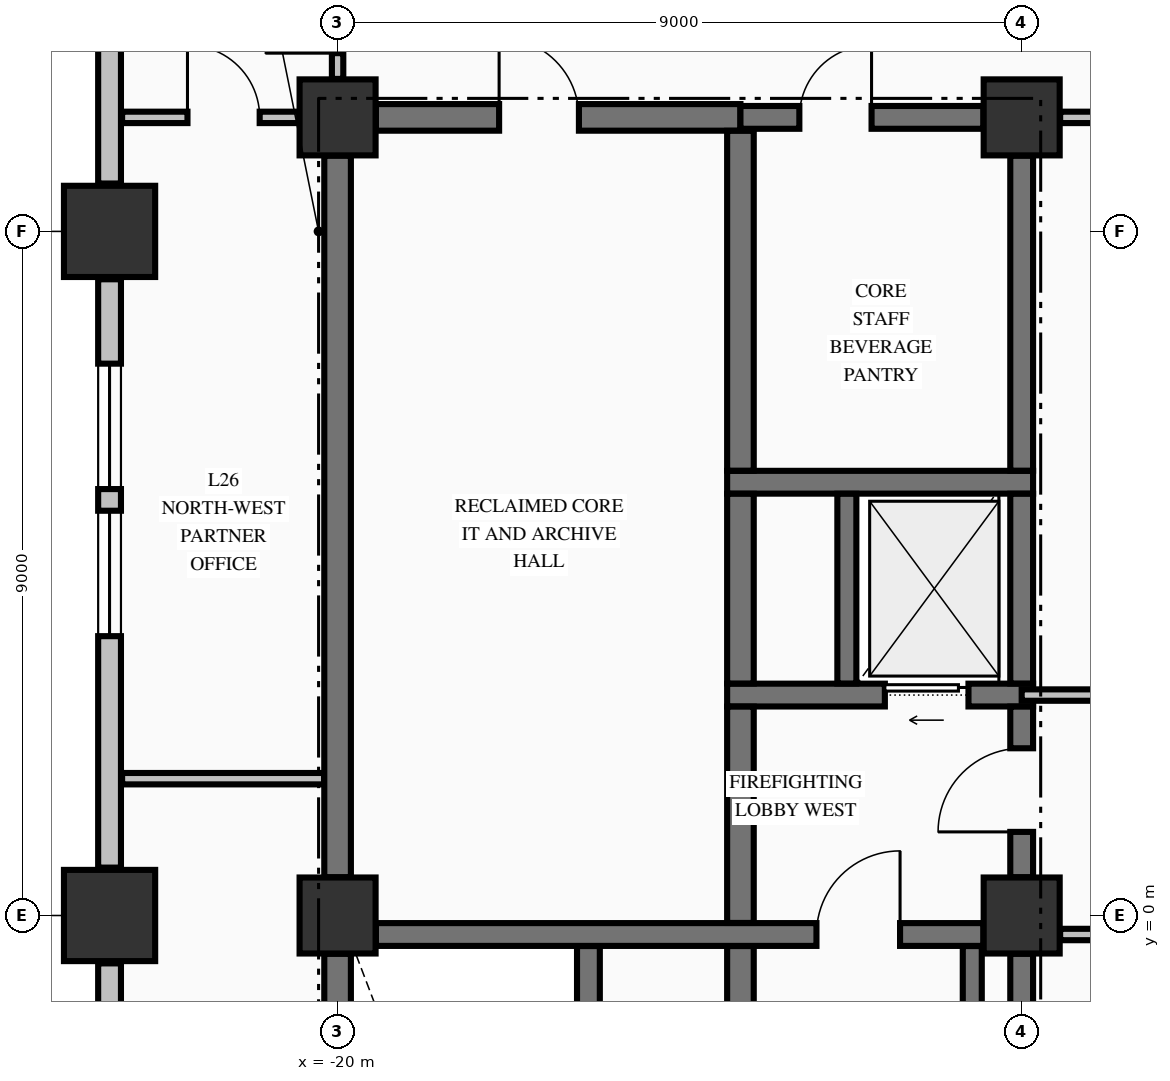
"""IFC4 building model, lengths in metres.
Left out: names, types, materials, properties, quantities, classifications, styles, units other than length and angle.
Written with IfcOpenShell. Run it as: python <this file> out.ifc"""

import sys

from ifc_helpers import new_model, si_unit, direction, frame, frame_2d, origin, origin_2d, place, context, subcontext, project, spatial, rectangle, extrude, element, fill, save


model = new_model("IFC4")
c1 = context("Model", 3, precision=1e-05, world=origin(), true_north=direction((0.0, 1.0)))
c2 = subcontext(c1, "Body", "Model", "MODEL_VIEW")
j1 = project(units=[si_unit("LENGTHUNIT", "METRE"), si_unit("PLANEANGLEUNIT", "RADIAN")], contexts=[c1])
p1 = place(None, origin())
s1 = spatial("IfcSite", under=j1, at=p1, CompositionType="ELEMENT")
p2 = place(p1, origin())
s2 = spatial("IfcBuilding", under=s1, at=p2, CompositionType="ELEMENT")
p3 = place(p2, frame((0.0, 0.0, 105.64)))
s3 = spatial("IfcBuildingStorey", under=s2, at=p3, CompositionType="ELEMENT", Elevation=105.64)
for number, where, z_axis, x_axis in (
    (1, (-23.0, 0.0, -0.25), (0.0, 0.0, 1.0), (1.0, 0.0, 0.0)),
    (2, (-23.0, 9.0, -0.25), (0.0, 0.0, 1.0), (1.0, 0.0, 0.0)),
):
    element("IfcColumn", number, at=place(p3, frame(where, z_axis=z_axis, x_axis=x_axis)), inside=s3, PredefinedType="COLUMN", context=c2, shape_type="SweptSolid", body=[
        extrude(rectangle(XDim=1.2, YDim=1.2, at=origin_2d()), origin(), (0.0, 0.0, 1.0), 3.57),
    ])
for number, where, z_axis, x_axis in (
    (3, (-20.0, 10.5, -0.25), (0.0, 0.0, 1.0), (1.0, 0.0, 0.0)),
    (4, (-11.0, 0.0, -0.25), (0.0, 0.0, 1.0), (1.0, 0.0, 0.0)),
    (5, (-11.0, 10.5, -0.25), (0.0, 0.0, 1.0), (1.0, 0.0, 0.0)),
    (6, (-20.0, 0.0, -0.25), (0.0, 0.0, 1.0), (1.0, 0.0, 0.0)),
):
    element("IfcColumn", number, at=place(p3, frame(where, z_axis=z_axis, x_axis=x_axis)), inside=s3, PredefinedType="COLUMN", context=c2, shape_type="SweptSolid", body=[
        extrude(rectangle(XDim=1.0, YDim=1.0, at=origin_2d()), origin(), (0.0, 0.0, 1.0), 3.57),
    ])
p4 = place(p3, frame((-23.0, -0.63, 0.0), z_axis=(0.0, 0.0, 1.0), x_axis=(0.0, -1.0, 0.0)))
e7 = element("IfcWall", 7, at=p4, inside=s3, PredefinedType="STANDARD", context=c2, shape_type="SweptSolid", body=[
    extrude(rectangle(XDim=7.74, YDim=0.3, at=frame_2d((3.87, 0.0))), origin(), (0.0, 0.0, 1.0), 2.712),
])
p5 = place(p4, frame((1.11, 0.0, 0.8)))
e8 = element("IfcOpeningElement", 8, at=p5, cuts=e7, PredefinedType="OPENING", context=c2, shape_type="SweptSolid", body=[
    extrude(rectangle(XDim=1.65, YDim=1.7, at=frame_2d((0.825, 0.85))), frame((0.0, 0.16, 0.0), z_axis=(0.0, -1.0, 0.0), x_axis=(1.0, 0.0, 0.0)), (0.0, 0.0, 1.0), 0.32),
])
p6 = place(p4, frame((3.045, 0.0, 0.8)))
e9 = element("IfcOpeningElement", 9, at=p6, cuts=e7, PredefinedType="OPENING", context=c2, shape_type="SweptSolid", body=[
    extrude(rectangle(XDim=1.65, YDim=1.7, at=frame_2d((0.825, 0.85))), frame((0.0, 0.16, 0.0), z_axis=(0.0, -1.0, 0.0), x_axis=(1.0, 0.0, 0.0)), (0.0, 0.0, 1.0), 0.32),
])
p7 = place(p4, frame((4.98, 0.0, 0.8)))
e10 = element("IfcOpeningElement", 10, at=p7, cuts=e7, PredefinedType="OPENING", context=c2, shape_type="SweptSolid", body=[
    extrude(rectangle(XDim=1.65, YDim=1.7, at=frame_2d((0.825, 0.85))), frame((0.0, 0.16, 0.0), z_axis=(0.0, -1.0, 0.0), x_axis=(1.0, 0.0, 0.0)), (0.0, 0.0, 1.0), 0.32),
])
p8 = place(p3, frame((-23.0, 8.37, 0.0), z_axis=(0.0, 0.0, 1.0), x_axis=(0.0, -1.0, 0.0)))
e11 = element("IfcWall", 11, at=p8, inside=s3, PredefinedType="STANDARD", context=c2, shape_type="SweptSolid", body=[
    extrude(rectangle(XDim=7.74, YDim=0.3, at=frame_2d((3.87, 0.0))), origin(), (0.0, 0.0, 1.0), 2.712),
])
p9 = place(p8, frame((1.11, 0.0, 0.8)))
e12 = element("IfcOpeningElement", 12, at=p9, cuts=e11, PredefinedType="OPENING", context=c2, shape_type="SweptSolid", body=[
    extrude(rectangle(XDim=1.65, YDim=1.7, at=frame_2d((0.825, 0.85))), frame((0.0, 0.16, 0.0), z_axis=(0.0, -1.0, 0.0), x_axis=(1.0, 0.0, 0.0)), (0.0, 0.0, 1.0), 0.32),
])
p10 = place(p8, frame((3.045, 0.0, 0.8)))
e13 = element("IfcOpeningElement", 13, at=p10, cuts=e11, PredefinedType="OPENING", context=c2, shape_type="SweptSolid", body=[
    extrude(rectangle(XDim=1.65, YDim=1.7, at=frame_2d((0.825, 0.85))), frame((0.0, 0.16, 0.0), z_axis=(0.0, -1.0, 0.0), x_axis=(1.0, 0.0, 0.0)), (0.0, 0.0, 1.0), 0.32),
])
p11 = place(p3, frame((-23.0, 20.37, 0.0), z_axis=(0.0, 0.0, 1.0), x_axis=(0.0, -1.0, 0.0)))
e14 = element("IfcWall", 14, at=p11, inside=s3, PredefinedType="STANDARD", context=c2, shape_type="SweptSolid", body=[
    extrude(rectangle(XDim=10.74, YDim=0.3, at=frame_2d((5.37, 0.0))), origin(), (0.0, 0.0, 1.0), 2.712),
])
p12 = place(p3, frame((-19.496, -0.25, 0.0), z_axis=(0.0, 0.0, 1.0), x_axis=(1.0, 0.0, 0.0)))
e15 = element("IfcWall", 15, at=p12, inside=s3, PredefinedType="SHEAR", context=c2, shape_type="SweptSolid", body=[
    extrude(rectangle(XDim=7.992, YDim=0.3, at=frame_2d((3.996, 0.0))), origin(), (0.0, 0.0, 1.0), 3.32),
])
p13 = place(p12, frame((5.796, 0.0, 0.0)))
e16 = element("IfcOpeningElement", 16, at=p13, cuts=e15, PredefinedType="OPENING", context=c2, shape_type="SweptSolid", body=[
    extrude(rectangle(XDim=1.1, YDim=2.15, at=frame_2d((0.55, 1.075))), frame((0.0, 0.16, 0.0), z_axis=(0.0, -1.0, 0.0), x_axis=(1.0, 0.0, 0.0)), (0.0, 0.0, 1.0), 0.32),
])
p14 = place(p3, frame((-14.875, 2.9, 0.0), z_axis=(0.0, 0.0, 1.0), x_axis=(1.0, 0.0, 0.0)))
e17 = element("IfcWall", 17, at=p14, inside=s3, PredefinedType="SHEAR", context=c2, shape_type="SweptSolid", body=[
    extrude(rectangle(XDim=4.025, YDim=0.3, at=frame_2d((2.012, 0.0))), origin(), (0.0, 0.0, 1.0), 3.32),
])
p15 = place(p14, frame((2.075, 0.0, 0.0)))
e18 = element("IfcOpeningElement", 18, at=p15, cuts=e17, PredefinedType="OPENING", context=c2, shape_type="SweptSolid", body=[
    extrude(rectangle(XDim=1.1, YDim=2.2, at=frame_2d((0.55, 1.1))), frame((0.0, 0.16, 0.0), z_axis=(0.0, -1.0, 0.0), x_axis=(1.0, 0.0, 0.0)), (0.0, 0.0, 1.0), 0.32),
])
p16 = place(p3, frame((-14.875, 5.7, 0.0), z_axis=(0.0, 0.0, 1.0), x_axis=(1.0, 0.0, 0.0)))
e19 = element("IfcWall", 19, at=p16, inside=s3, PredefinedType="SHEAR", context=c2, shape_type="SweptSolid", body=[
    extrude(rectangle(XDim=4.025, YDim=0.3, at=frame_2d((2.012, 0.0))), origin(), (0.0, 0.0, 1.0), 3.32),
])
p17 = place(p3, frame((-19.496, 10.5, 0.0), z_axis=(0.0, 0.0, 1.0), x_axis=(1.0, 0.0, 0.0)))
e20 = element("IfcWall", 20, at=p17, inside=s3, PredefinedType="SHEAR", context=c2, shape_type="SweptSolid", body=[
    extrude(rectangle(XDim=4.796, YDim=0.35, at=frame_2d((2.398, 0.0))), origin(), (0.0, 0.0, 1.0), 3.32),
])
p18 = place(p17, frame((1.621, 0.0, 0.0)))
e21 = element("IfcOpeningElement", 21, at=p18, cuts=e20, PredefinedType="OPENING", context=c2, shape_type="SweptSolid", body=[
    extrude(rectangle(XDim=1.05, YDim=2.15, at=frame_2d((0.525, 1.075))), frame((0.0, 0.185, 0.0), z_axis=(0.0, -1.0, 0.0), x_axis=(1.0, 0.0, 0.0)), (0.0, 0.0, 1.0), 0.37),
])
p19 = place(p3, frame((-14.7, 10.5, 0.0), z_axis=(0.0, 0.0, 1.0), x_axis=(1.0, 0.0, 0.0)))
e22 = element("IfcWall", 22, at=p19, inside=s3, PredefinedType="SHEAR", context=c2, shape_type="SweptSolid", body=[
    extrude(rectangle(XDim=3.196, YDim=0.3, at=frame_2d((1.598, 0.0))), origin(), (0.0, 0.0, 1.0), 3.32),
])
p20 = place(p19, frame((0.775, 0.0, 0.0)))
e23 = element("IfcOpeningElement", 23, at=p20, cuts=e22, PredefinedType="OPENING", context=c2, shape_type="SweptSolid", body=[
    extrude(rectangle(XDim=0.95, YDim=2.15, at=frame_2d((0.475, 1.075))), frame((0.0, 0.16, 0.0), z_axis=(0.0, -1.0, 0.0), x_axis=(1.0, 0.0, 0.0)), (0.0, 0.0, 1.0), 0.32),
])
p21 = place(p3, frame((-10.494, -0.25, 0.0), z_axis=(0.0, 0.0, 1.0), x_axis=(1.0, 0.0, 0.0)))
e24 = element("IfcWall", 24, at=p21, inside=s3, PredefinedType="PARTITIONING", context=c2, shape_type="SweptSolid", body=[
    extrude(rectangle(XDim=20.988, YDim=0.15, at=frame_2d((10.494, 0.0))), origin(), (0.0, 0.0, 1.0), 3.32),
])
p22 = place(p21, frame((13.994, 0.0, 0.0)))
e25 = element("IfcOpeningElement", 25, at=p22, cuts=e24, PredefinedType="OPENING", context=c2, shape_type="SweptSolid", body=[
    extrude(rectangle(XDim=1.1, YDim=2.15, at=frame_2d((0.55, 1.075))), frame((0.0, 0.085, 0.0), z_axis=(0.0, -1.0, 0.0), x_axis=(1.0, 0.0, 0.0)), (0.0, 0.0, 1.0), 0.17),
])
p23 = place(p21, frame((5.939, 0.0, 0.0)))
e26 = element("IfcOpeningElement", 26, at=p23, cuts=e24, PredefinedType="OPENING", context=c2, shape_type="SweptSolid", body=[
    extrude(rectangle(XDim=1.05, YDim=2.15, at=frame_2d((0.525, 1.075))), frame((0.0, 0.085, 0.0), z_axis=(0.0, -1.0, 0.0), x_axis=(1.0, 0.0, 0.0)), (0.0, 0.0, 1.0), 0.17),
])
p24 = place(p21, frame((18.089, 0.0, 0.0)))
e27 = element("IfcOpeningElement", 27, at=p24, cuts=e24, PredefinedType="OPENING", context=c2, shape_type="SweptSolid", body=[
    extrude(rectangle(XDim=0.95, YDim=2.15, at=frame_2d((0.475, 1.075))), frame((0.0, 0.085, 0.0), z_axis=(0.0, -1.0, 0.0), x_axis=(1.0, 0.0, 0.0)), (0.0, 0.0, 1.0), 0.17),
])
p25 = place(p3, frame((-22.835, 1.8, 0.0), z_axis=(0.0, 0.0, 1.0), x_axis=(1.0, 0.0, 0.0)))
e28 = element("IfcWall", 28, at=p25, inside=s3, PredefinedType="PARTITIONING", context=c2, shape_type="SweptSolid", body=[
    extrude(rectangle(XDim=2.657, YDim=0.15, at=frame_2d((1.329, 0.0))), origin(), (0.0, 0.0, 1.0), 3.32),
])
p26 = place(p3, frame((-11.0, 2.9, 0.0), z_axis=(0.0, 0.0, 1.0), x_axis=(1.0, 0.0, 0.0)))
e29 = element("IfcWall", 29, at=p26, inside=s3, PredefinedType="PARTITIONING", context=c2, shape_type="SweptSolid", body=[
    extrude(rectangle(XDim=22.0, YDim=0.15, at=frame_2d((11.0, 0.0))), origin(), (0.0, 0.0, 1.0), 3.32),
])
p27 = place(p26, frame((14.5, 0.0, 0.0)))
e30 = element("IfcOpeningElement", 30, at=p27, cuts=e29, PredefinedType="OPENING", context=c2, shape_type="SweptSolid", body=[
    extrude(rectangle(XDim=1.1, YDim=2.15, at=frame_2d((0.55, 1.075))), frame((0.0, 0.085, 0.0), z_axis=(0.0, -1.0, 0.0), x_axis=(1.0, 0.0, 0.0)), (0.0, 0.0, 1.0), 0.17),
])
p28 = place(p26, frame((6.445, 0.0, 0.0)))
e31 = element("IfcOpeningElement", 31, at=p28, cuts=e29, PredefinedType="OPENING", context=c2, shape_type="SweptSolid", body=[
    extrude(rectangle(XDim=1.05, YDim=2.15, at=frame_2d((0.525, 1.075))), frame((0.0, 0.085, 0.0), z_axis=(0.0, -1.0, 0.0), x_axis=(1.0, 0.0, 0.0)), (0.0, 0.0, 1.0), 0.17),
])
p29 = place(p26, frame((18.52, 0.0, 0.0)))
e32 = element("IfcOpeningElement", 32, at=p29, cuts=e29, PredefinedType="OPENING", context=c2, shape_type="SweptSolid", body=[
    extrude(rectangle(XDim=1.1, YDim=2.15, at=frame_2d((0.55, 1.075))), frame((0.0, 0.085, 0.0), z_axis=(0.0, -1.0, 0.0), x_axis=(1.0, 0.0, 0.0)), (0.0, 0.0, 1.0), 0.17),
])
p30 = place(p3, frame((-22.835, 10.5, 0.0), z_axis=(0.0, 0.0, 1.0), x_axis=(1.0, 0.0, 0.0)))
e33 = element("IfcWall", 33, at=p30, inside=s3, PredefinedType="PARTITIONING", context=c2, shape_type="SweptSolid", body=[
    extrude(rectangle(XDim=2.329, YDim=0.15, at=frame_2d((1.165, 0.0))), origin(), (0.0, 0.0, 1.0), 3.32),
])
p31 = place(p30, frame((0.86, 0.0, 0.0)))
e34 = element("IfcOpeningElement", 34, at=p31, cuts=e33, PredefinedType="OPENING", context=c2, shape_type="SweptSolid", body=[
    extrude(rectangle(XDim=0.95, YDim=2.15, at=frame_2d((0.475, 1.075))), frame((0.0, 0.085, 0.0), z_axis=(0.0, -1.0, 0.0), x_axis=(1.0, 0.0, 0.0)), (0.0, 0.0, 1.0), 0.17),
])
p32 = place(p3, frame((-10.494, 10.5, 0.0), z_axis=(0.0, 0.0, 1.0), x_axis=(1.0, 0.0, 0.0)))
e35 = element("IfcWall", 35, at=p32, inside=s3, PredefinedType="PARTITIONING", context=c2, shape_type="SweptSolid", body=[
    extrude(rectangle(XDim=20.988, YDim=0.15, at=frame_2d((10.494, 0.0))), origin(), (0.0, 0.0, 1.0), 3.32),
])
p33 = place(p32, frame((13.994, 0.0, 0.0)))
e36 = element("IfcOpeningElement", 36, at=p33, cuts=e35, PredefinedType="OPENING", context=c2, shape_type="SweptSolid", body=[
    extrude(rectangle(XDim=1.1, YDim=2.15, at=frame_2d((0.55, 1.075))), frame((0.0, 0.085, 0.0), z_axis=(0.0, -1.0, 0.0), x_axis=(1.0, 0.0, 0.0)), (0.0, 0.0, 1.0), 0.17),
])
p34 = place(p3, frame((-20.0, -9.446, 0.0), z_axis=(0.0, 0.0, 1.0), x_axis=(0.0, 1.0, 0.0)))
e37 = element("IfcWall", 37, at=p34, inside=s3, PredefinedType="SHEAR", context=c2, shape_type="SweptSolid", body=[
    extrude(rectangle(XDim=8.942, YDim=0.35, at=frame_2d((4.471, 0.0))), origin(), (0.0, 0.0, 1.0), 3.32),
])
p35 = place(p3, frame((-20.0, 0.504, 0.0), z_axis=(0.0, 0.0, 1.0), x_axis=(0.0, 1.0, 0.0)))
e38 = element("IfcWall", 38, at=p35, inside=s3, PredefinedType="SHEAR", context=c2, shape_type="SweptSolid", body=[
    extrude(rectangle(XDim=9.492, YDim=0.35, at=frame_2d((4.746, 0.0))), origin(), (0.0, 0.0, 1.0), 3.32),
])
p36 = place(p3, frame((-16.7, -9.773, 0.0), z_axis=(0.0, 0.0, 1.0), x_axis=(0.0, 1.0, 0.0)))
e39 = element("IfcWall", 39, at=p36, inside=s3, PredefinedType="SHEAR", context=c2, shape_type="SweptSolid", body=[
    extrude(rectangle(XDim=9.371, YDim=0.3, at=frame_2d((4.686, 0.0))), origin(), (0.0, 0.0, 1.0), 3.32),
])
p37 = place(p3, frame((-14.7, -9.773, 0.0), z_axis=(0.0, 0.0, 1.0), x_axis=(0.0, 1.0, 0.0)))
e40 = element("IfcWall", 40, at=p37, inside=s3, PredefinedType="SHEAR", context=c2, shape_type="SweptSolid", body=[
    extrude(rectangle(XDim=9.371, YDim=0.35, at=frame_2d((4.686, 0.0))), origin(), (0.0, 0.0, 1.0), 3.32),
])
p38 = place(p3, frame((-14.7, -0.098, 0.0), z_axis=(0.0, 0.0, 1.0), x_axis=(0.0, 1.0, 0.0)))
e41 = element("IfcWall", 41, at=p38, inside=s3, PredefinedType="SHEAR", context=c2, shape_type="SweptSolid", body=[
    extrude(rectangle(XDim=2.846, YDim=0.35, at=frame_2d((1.423, 0.0))), origin(), (0.0, 0.0, 1.0), 3.32),
])
p39 = place(p3, frame((-14.7, 3.052, 0.0), z_axis=(0.0, 0.0, 1.0), x_axis=(0.0, 1.0, 0.0)))
e42 = element("IfcWall", 42, at=p39, inside=s3, PredefinedType="SHEAR", context=c2, shape_type="SweptSolid", body=[
    extrude(rectangle(XDim=2.496, YDim=0.35, at=frame_2d((1.248, 0.0))), origin(), (0.0, 0.0, 1.0), 3.32),
])
p40 = place(p3, frame((-14.7, 5.852, 0.0), z_axis=(0.0, 0.0, 1.0), x_axis=(0.0, 1.0, 0.0)))
e43 = element("IfcWall", 43, at=p40, inside=s3, PredefinedType="SHEAR", context=c2, shape_type="SweptSolid", body=[
    extrude(rectangle(XDim=4.471, YDim=0.35, at=frame_2d((2.235, 0.0))), origin(), (0.0, 0.0, 1.0), 3.32),
])
p41 = place(p3, frame((-13.3, 3.052, 0.0), z_axis=(0.0, 0.0, 1.0), x_axis=(0.0, 1.0, 0.0)))
e44 = element("IfcWall", 44, at=p41, inside=s3, PredefinedType="SOLIDWALL", context=c2, shape_type="SweptSolid", body=[
    extrude(rectangle(XDim=2.496, YDim=0.25, at=frame_2d((1.248, 0.0))), origin(), (0.0, 0.0, 1.0), 3.32),
])
p42 = place(p3, frame((-11.65, -9.798, 0.0), z_axis=(0.0, 0.0, 1.0), x_axis=(0.0, 1.0, 0.0)))
e45 = element("IfcWall", 45, at=p42, inside=s3, PredefinedType="SOLIDWALL", context=c2, shape_type="SweptSolid", body=[
    extrude(rectangle(XDim=9.396, YDim=0.25, at=frame_2d((4.698, 0.0))), origin(), (0.0, 0.0, 1.0), 3.32),
])
p43 = place(p3, frame((-11.0, -9.446, 0.0), z_axis=(0.0, 0.0, 1.0), x_axis=(0.0, 1.0, 0.0)))
e46 = element("IfcWall", 46, at=p43, inside=s3, PredefinedType="SHEAR", context=c2, shape_type="SweptSolid", body=[
    extrude(rectangle(XDim=8.942, YDim=0.3, at=frame_2d((4.471, 0.0))), origin(), (0.0, 0.0, 1.0), 3.32),
])
p44 = place(p3, frame((-11.0, 0.504, 0.0), z_axis=(0.0, 0.0, 1.0), x_axis=(0.0, 1.0, 0.0)))
e47 = element("IfcWall", 47, at=p44, inside=s3, PredefinedType="SHEAR", context=c2, shape_type="SweptSolid", body=[
    extrude(rectangle(XDim=2.244, YDim=0.3, at=frame_2d((1.122, 0.0))), origin(), (0.0, 0.0, 1.0), 3.32),
])
p45 = place(p44, frame((0.596, 0.0, 0.0)))
e48 = element("IfcOpeningElement", 48, at=p45, cuts=e47, PredefinedType="OPENING", context=c2, shape_type="SweptSolid", body=[
    extrude(rectangle(XDim=1.1, YDim=2.15, at=frame_2d((0.55, 1.075))), frame((0.0, 0.16, 0.0), z_axis=(0.0, -1.0, 0.0), x_axis=(1.0, 0.0, 0.0)), (0.0, 0.0, 1.0), 0.32),
])
p46 = place(p3, frame((-11.0, 3.052, 0.0), z_axis=(0.0, 0.0, 1.0), x_axis=(0.0, 1.0, 0.0)))
e49 = element("IfcWall", 49, at=p46, inside=s3, PredefinedType="SHEAR", context=c2, shape_type="SweptSolid", body=[
    extrude(rectangle(XDim=2.496, YDim=0.3, at=frame_2d((1.248, 0.0))), origin(), (0.0, 0.0, 1.0), 3.32),
])
p47 = place(p3, frame((-11.0, 5.852, 0.0), z_axis=(0.0, 0.0, 1.0), x_axis=(0.0, 1.0, 0.0)))
e50 = element("IfcWall", 50, at=p47, inside=s3, PredefinedType="SHEAR", context=c2, shape_type="SweptSolid", body=[
    extrude(rectangle(XDim=4.144, YDim=0.3, at=frame_2d((2.072, 0.0))), origin(), (0.0, 0.0, 1.0), 3.32),
])
p48 = place(p3, frame((-20.0, 11.006, 0.0), z_axis=(0.0, 0.0, 1.0), x_axis=(0.0, 1.0, 0.0)))
e51 = element("IfcWall", 51, at=p48, inside=s3, PredefinedType="PARTITIONING", context=c2, shape_type="SweptSolid", body=[
    extrude(rectangle(XDim=2.066, YDim=0.15, at=frame_2d((1.033, 0.0))), origin(), (0.0, 0.0, 1.0), 2.81),
])
p49 = place(p48, frame((0.339, 0.0, 0.0)))
e52 = element("IfcOpeningElement", 52, at=p49, cuts=e51, PredefinedType="OPENING", context=c2, shape_type="SweptSolid", body=[
    extrude(rectangle(XDim=0.95, YDim=2.15, at=frame_2d((0.475, 1.075))), frame((0.0, 0.085, 0.0), z_axis=(0.0, -1.0, 0.0), x_axis=(1.0, 0.0, 0.0)), (0.0, 0.0, 1.0), 0.17),
])
p50 = place(p9, origin())
e53 = element("IfcWindow", 53, at=p50, inside=s3, PartitioningType="SINGLE_PANEL", PredefinedType="WINDOW", context=c2, shape_type="SweptSolid", body=[
    extrude(rectangle(XDim=1.65, YDim=1.7, at=frame_2d((0.825, 0.85))), frame((0.0, 0.03, 0.0), z_axis=(0.0, -1.0, 0.0), x_axis=(1.0, 0.0, 0.0)), (0.0, 0.0, 1.0), 0.06),
])
fill(e12, e53)
p51 = place(p10, origin())
e54 = element("IfcWindow", 54, at=p51, inside=s3, PartitioningType="SINGLE_PANEL", PredefinedType="WINDOW", context=c2, shape_type="SweptSolid", body=[
    extrude(rectangle(XDim=1.65, YDim=1.7, at=frame_2d((0.825, 0.85))), frame((0.0, 0.03, 0.0), z_axis=(0.0, -1.0, 0.0), x_axis=(1.0, 0.0, 0.0)), (0.0, 0.0, 1.0), 0.06),
])
fill(e13, e54)
p52 = place(p13, origin())
e55 = element("IfcDoor", 55, at=p52, inside=s3, OperationType="SINGLE_SWING_RIGHT", PredefinedType="DOOR", context=c2, shape_type="SweptSolid", body=[
    extrude(rectangle(XDim=1.1, YDim=2.15, at=frame_2d((0.55, 1.075))), frame((0.0, 0.025, 0.0), z_axis=(0.0, -1.0, 0.0), x_axis=(1.0, 0.0, 0.0)), (0.0, 0.0, 1.0), 0.05),
])
fill(e16, e55)
p53 = place(p45, origin())
e56 = element("IfcDoor", 56, at=p53, inside=s3, OperationType="SINGLE_SWING_LEFT", PredefinedType="DOOR", context=c2, shape_type="SweptSolid", body=[
    extrude(rectangle(XDim=1.1, YDim=2.15, at=frame_2d((0.55, 1.075))), frame((0.0, 0.025, 0.0), z_axis=(0.0, -1.0, 0.0), x_axis=(1.0, 0.0, 0.0)), (0.0, 0.0, 1.0), 0.05),
])
fill(e48, e56)
p54 = place(p15, origin())
e57 = element("IfcDoor", 57, at=p54, inside=s3, OperationType="SLIDING_TO_LEFT", PredefinedType="DOOR", context=c2, shape_type="SweptSolid", body=[
    extrude(rectangle(XDim=1.1, YDim=2.2, at=frame_2d((0.55, 1.1))), frame((0.0, 0.025, 0.0), z_axis=(0.0, -1.0, 0.0), x_axis=(1.0, 0.0, 0.0)), (0.0, 0.0, 1.0), 0.05),
])
fill(e18, e57)
p55 = place(p20, origin())
e58 = element("IfcDoor", 58, at=p55, inside=s3, OperationType="SINGLE_SWING_RIGHT", PredefinedType="DOOR", context=c2, shape_type="SweptSolid", body=[
    extrude(rectangle(XDim=0.95, YDim=2.15, at=frame_2d((0.475, 1.075))), frame((0.0, 0.025, 0.0), z_axis=(0.0, -1.0, 0.0), x_axis=(1.0, 0.0, 0.0)), (0.0, 0.0, 1.0), 0.05),
])
fill(e23, e58)
p56 = place(p18, origin())
e59 = element("IfcDoor", 59, at=p56, inside=s3, OperationType="SINGLE_SWING_LEFT", PredefinedType="DOOR", context=c2, shape_type="SweptSolid", body=[
    extrude(rectangle(XDim=1.05, YDim=2.15, at=frame_2d((0.525, 1.075))), frame((0.0, 0.025, 0.0), z_axis=(0.0, -1.0, 0.0), x_axis=(1.0, 0.0, 0.0)), (0.0, 0.0, 1.0), 0.05),
])
fill(e21, e59)
p57 = place(p49, origin())
e60 = element("IfcDoor", 60, at=p57, inside=s3, OperationType="SINGLE_SWING_LEFT", PredefinedType="DOOR", context=c2, shape_type="SweptSolid", body=[
    extrude(rectangle(XDim=0.95, YDim=2.15, at=frame_2d((0.475, 1.075))), frame((0.0, 0.025, 0.0), z_axis=(0.0, -1.0, 0.0), x_axis=(1.0, 0.0, 0.0)), (0.0, 0.0, 1.0), 0.05),
])
fill(e52, e60)
p58 = place(p31, origin())
e61 = element("IfcDoor", 61, at=p58, inside=s3, OperationType="SINGLE_SWING_LEFT", PredefinedType="DOOR", context=c2, shape_type="SweptSolid", body=[
    extrude(rectangle(XDim=0.95, YDim=2.15, at=frame_2d((0.475, 1.075))), frame((0.0, 0.025, 0.0), z_axis=(0.0, -1.0, 0.0), x_axis=(1.0, 0.0, 0.0)), (0.0, 0.0, 1.0), 0.05),
])
fill(e34, e61)
save(model, sys.argv[1])
